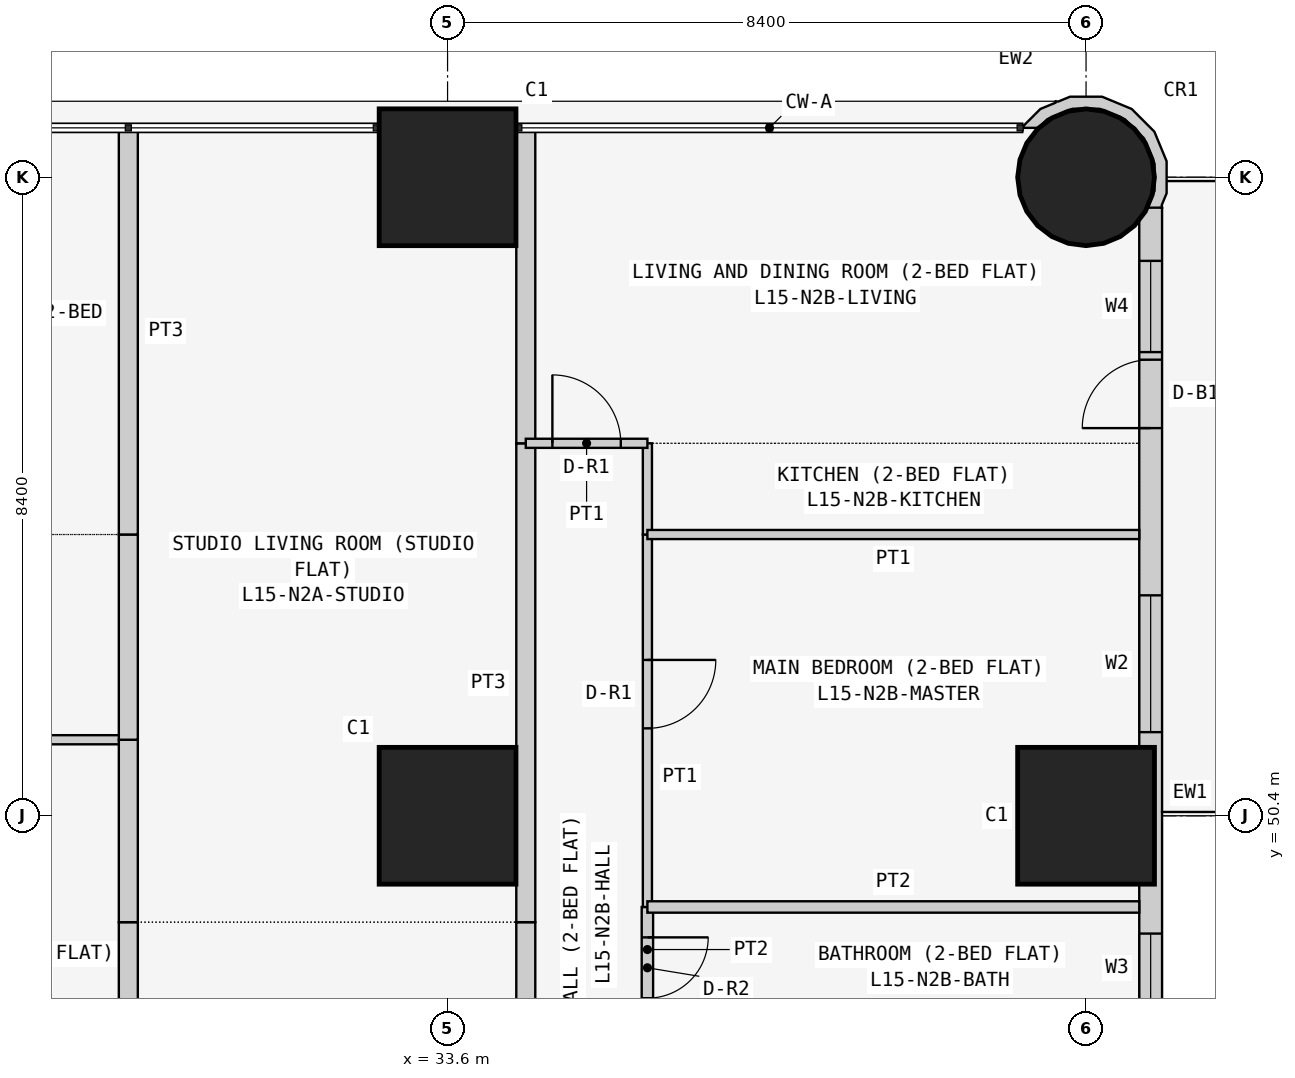
"""IFC4 building model, lengths in metres.
Left out: names, types, materials, properties, quantities, classifications, styles, units other than length and angle.
Written with IfcOpenShell. Run it as: python <this file> out.ifc"""

import sys

from ifc_helpers import new_model, si_unit, direction, frame, frame_2d, origin, origin_2d, place, context, subcontext, project, spatial, polyline, rectangle, circle, outline, extrude, element, fill, save


model = new_model("IFC4")
c1 = context("Model", 3, precision=1e-05, world=origin(), true_north=direction((0.0, 1.0)))
c2 = subcontext(c1, "Body", "Model", "MODEL_VIEW")
j1 = project(units=[si_unit("LENGTHUNIT", "METRE"), si_unit("PLANEANGLEUNIT", "RADIAN")], contexts=[c1])
p1 = place(None, origin())
s1 = spatial("IfcSite", under=j1, at=p1, CompositionType="ELEMENT")
p2 = place(p1, origin())
s2 = spatial("IfcBuilding", under=s1, at=p2, CompositionType="ELEMENT")
p3 = place(p2, frame((0.0, 0.0, 63.3)))
s3 = spatial("IfcBuildingStorey", under=s2, at=p3, CompositionType="ELEMENT", Elevation=63.3)
for number, where, z_axis, x_axis in (
    (1, (33.6, 50.4, 0.0), (0.0, 0.0, 1.0), (1.0, 0.0, 0.0)),
    (2, (33.6, 58.8, 0.0), (0.0, 0.0, 1.0), (1.0, 0.0, 0.0)),
    (3, (42.0, 50.4, 0.0), (0.0, 0.0, 1.0), (1.0, 0.0, 0.0)),
):
    element("IfcColumn", number, at=place(p3, frame(where, z_axis=z_axis, x_axis=x_axis)), inside=s3, PredefinedType="COLUMN", context=c2, shape_type="SweptSolid", body=[
        extrude(rectangle(XDim=1.8, YDim=1.8, at=origin_2d()), origin(), (0.0, 0.0, 1.0), 3.6),
    ])
p4 = place(p3, frame((42.0, 58.8, 0.0), z_axis=(0.0, 0.0, 1.0), x_axis=(1.0, 0.0, 0.0)))
e4 = element("IfcColumn", 4, at=p4, inside=s3, PredefinedType="COLUMN", context=c2, shape_type="SweptSolid", body=[
    extrude(circle(Radius=0.9, at=origin_2d()), origin(), (0.0, 0.0, 1.0), 3.6),
])
p5 = place(p3, frame((42.85, 43.0, 0.0), z_axis=(0.0, 0.0, 1.0), x_axis=(0.0, 1.0, 0.0)))
e5 = element("IfcWall", 5, at=p5, inside=s3, PredefinedType="SOLIDWALL", context=c2, shape_type="SweptSolid", body=[
    extrude(rectangle(XDim=15.4, YDim=0.3, at=frame_2d((7.7, 0.0))), origin(), (0.0, 0.0, 1.0), 3.45),
])
p6 = place(p5, frame((1.2, 0.0, 0.9)))
e6 = element("IfcOpeningElement", 6, at=p6, cuts=e5, PredefinedType="OPENING", context=c2, shape_type="SweptSolid", body=[
    extrude(rectangle(XDim=1.8, YDim=1.5, at=frame_2d((0.9, 0.75))), frame((0.0, 0.16, 0.0), z_axis=(0.0, -1.0, 0.0), x_axis=(1.0, 0.0, 0.0)), (0.0, 0.0, 1.0), 0.32),
])
p7 = place(p5, frame((4.95, 0.0, 1.5)))
e7 = element("IfcOpeningElement", 7, at=p7, cuts=e5, PredefinedType="OPENING", context=c2, shape_type="SweptSolid", body=[
    extrude(rectangle(XDim=0.9, YDim=0.7, at=frame_2d((0.45, 0.35))), frame((0.0, 0.16, 0.0), z_axis=(0.0, -1.0, 0.0), x_axis=(1.0, 0.0, 0.0)), (0.0, 0.0, 1.0), 0.32),
])
p8 = place(p5, frame((8.5, 0.0, 0.9)))
e8 = element("IfcOpeningElement", 8, at=p8, cuts=e5, PredefinedType="OPENING", context=c2, shape_type="SweptSolid", body=[
    extrude(rectangle(XDim=1.8, YDim=1.5, at=frame_2d((0.9, 0.75))), frame((0.0, 0.16, 0.0), z_axis=(0.0, -1.0, 0.0), x_axis=(1.0, 0.0, 0.0)), (0.0, 0.0, 1.0), 0.32),
])
p9 = place(p5, frame((12.5, 0.0, 0.0)))
e9 = element("IfcOpeningElement", 9, at=p9, cuts=e5, PredefinedType="OPENING", context=c2, shape_type="SweptSolid", body=[
    extrude(rectangle(XDim=0.9, YDim=2.4, at=frame_2d((0.45, 1.2))), frame((0.0, 0.16, 0.0), z_axis=(0.0, -1.0, 0.0), x_axis=(1.0, 0.0, 0.0)), (0.0, 0.0, 1.0), 0.32),
])
p10 = place(p5, frame((13.5, 0.0, 0.9)))
e10 = element("IfcOpeningElement", 10, at=p10, cuts=e5, PredefinedType="OPENING", context=c2, shape_type="SweptSolid", body=[
    extrude(rectangle(XDim=1.2, YDim=1.5, at=frame_2d((0.6, 0.75))), frame((0.0, 0.16, 0.0), z_axis=(0.0, -1.0, 0.0), x_axis=(1.0, 0.0, 0.0)), (0.0, 0.0, 1.0), 0.32),
])
p11 = place(p3, frame((42.91, 58.436, 0.0), z_axis=(0.0, 0.0, 1.0), x_axis=(0.377204953059, 0.926129809145, 0.0)))
e11 = element("IfcWall", 11, at=p11, inside=s3, PredefinedType="SOLIDWALL", context=c2, shape_type="SweptSolid", body=[
    extrude(outline(polyline([(0.769, 1.728), (0.75, 1.723), (0.6, 1.875), (0.295, 2.004), (0.281, 1.998), (0.36, 1.803), (0.509, 1.741), (0.761, 1.486), (0.896, 1.154), (0.894, 0.795), (0.755, 0.465), (0.5, 0.213), (0.168, 0.078), (-0.1, 0.08), (0.001, -0.097), (0.03, -0.08), (0.198, -0.081), (0.589, 0.078), (0.889, 0.374), (1.052, 0.763), (1.055, 1.185), (0.896, 1.575), (0.778, 1.695), (0.769, 1.728)])), origin(), (0.0, 0.0, 1.0), 3.45),
])
p12 = place(p3, frame((29.4, 51.4, 0.0), z_axis=(0.0, 0.0, 1.0), x_axis=(-1.0, 0.0, 0.0)))
e12 = element("IfcWall", 12, at=p12, inside=s3, PredefinedType="PARTITIONING", context=c2, shape_type="SweptSolid", body=[
    extrude(rectangle(XDim=5.229, YDim=0.12, at=frame_2d((2.615, 0.0))), origin(), (0.0, 0.0, 1.0), 3.45),
])
for number, where, z_axis, x_axis in (
    (13, (29.4, 46.6, 0.0), (0.0, 0.0, 1.0), (0.0, 1.0, 0.0)),
    (14, (29.4, 49.0, 0.0), (0.0, 0.0, 1.0), (0.0, 1.0, 0.0)),
):
    element("IfcWall", number, at=place(p3, frame(where, z_axis=z_axis, x_axis=x_axis)), inside=s3, PredefinedType="PARTITIONING", context=c2, shape_type="SweptSolid", body=[
        extrude(rectangle(XDim=2.4, YDim=0.25, at=frame_2d((1.2, 0.0))), origin(), (0.0, 0.0, 1.0), 2.848),
    ])
p13 = place(p3, frame((29.4, 51.4, 0.0), z_axis=(0.0, 0.0, 1.0), x_axis=(0.0, 1.0, 0.0)))
e15 = element("IfcWall", 15, at=p13, inside=s3, PredefinedType="PARTITIONING", context=c2, shape_type="SweptSolid", body=[
    extrude(rectangle(XDim=2.7, YDim=0.25, at=frame_2d((1.35, 0.0))), origin(), (0.0, 0.0, 1.0), 2.848),
])
p14 = place(p3, frame((29.4, 54.1, 0.0), z_axis=(0.0, 0.0, 1.0), x_axis=(0.0, 1.0, 0.0)))
e16 = element("IfcWall", 16, at=p14, inside=s3, PredefinedType="PARTITIONING", context=c2, shape_type="SweptSolid", body=[
    extrude(rectangle(XDim=5.35, YDim=0.25, at=frame_2d((2.675, 0.0))), origin(), (0.0, 0.0, 1.0), 2.848),
])
p15 = place(p3, frame((34.629, 49.0, 0.0), z_axis=(0.0, 0.0, 1.0), x_axis=(0.0, -1.0, 0.0)))
e17 = element("IfcWall", 17, at=p15, inside=s3, PredefinedType="PARTITIONING", context=c2, shape_type="SweptSolid", body=[
    extrude(rectangle(XDim=3.6, YDim=0.25, at=frame_2d((1.8, 0.0))), origin(), (0.0, 0.0, 1.0), 3.45),
])
p16 = place(p3, frame((34.629, 55.3, 0.0), z_axis=(0.0, 0.0, 1.0), x_axis=(0.0, -1.0, 0.0)))
e18 = element("IfcWall", 18, at=p16, inside=s3, PredefinedType="PARTITIONING", context=c2, shape_type="SweptSolid", body=[
    extrude(rectangle(XDim=6.3, YDim=0.25, at=frame_2d((3.15, 0.0))), origin(), (0.0, 0.0, 1.0), 3.45),
])
p17 = place(p3, frame((34.629, 59.45, 0.0), z_axis=(0.0, 0.0, 1.0), x_axis=(0.0, -1.0, 0.0)))
e19 = element("IfcWall", 19, at=p17, inside=s3, PredefinedType="PARTITIONING", context=c2, shape_type="SweptSolid", body=[
    extrude(rectangle(XDim=4.15, YDim=0.25, at=frame_2d((2.075, 0.0))), origin(), (0.0, 0.0, 1.0), 3.45),
])
p18 = place(p3, frame((36.229, 49.2, 0.0), z_axis=(0.0, 0.0, 1.0), x_axis=(0.0, -1.0, 0.0)))
e20 = element("IfcWall", 20, at=p18, inside=s3, PredefinedType="PARTITIONING", context=c2, shape_type="SweptSolid", body=[
    extrude(rectangle(XDim=1.6, YDim=0.15, at=frame_2d((0.8, 0.0))), origin(), (0.0, 0.0, 1.0), 3.45),
])
p19 = place(p18, frame((0.4, 0.0, 0.0)))
e21 = element("IfcOpeningElement", 21, at=p19, cuts=e20, PredefinedType="OPENING", context=c2, shape_type="SweptSolid", body=[
    extrude(rectangle(XDim=0.8, YDim=2.1, at=frame_2d((0.4, 1.05))), frame((0.0, 0.085, 0.0), z_axis=(0.0, -1.0, 0.0), x_axis=(1.0, 0.0, 0.0)), (0.0, 0.0, 1.0), 0.17),
])
p20 = place(p3, frame((36.229, 54.1, 0.0), z_axis=(0.0, 0.0, 1.0), x_axis=(0.0, -1.0, 0.0)))
e22 = element("IfcWall", 22, at=p20, inside=s3, PredefinedType="PARTITIONING", context=c2, shape_type="SweptSolid", body=[
    extrude(rectangle(XDim=4.9, YDim=0.12, at=frame_2d((2.45, 0.0))), origin(), (0.0, 0.0, 1.0), 3.45),
])
p21 = place(p20, frame((1.65, 0.0, 0.0)))
e23 = element("IfcOpeningElement", 23, at=p21, cuts=e22, PredefinedType="OPENING", context=c2, shape_type="SweptSolid", body=[
    extrude(rectangle(XDim=0.9, YDim=2.1, at=frame_2d((0.45, 1.05))), frame((0.0, 0.07, 0.0), z_axis=(0.0, -1.0, 0.0), x_axis=(1.0, 0.0, 0.0)), (0.0, 0.0, 1.0), 0.14),
])
p22 = place(p3, frame((36.229, 55.3, 0.0), z_axis=(0.0, 0.0, 1.0), x_axis=(0.0, -1.0, 0.0)))
e24 = element("IfcWall", 24, at=p22, inside=s3, PredefinedType="PARTITIONING", context=c2, shape_type="SweptSolid", body=[
    extrude(rectangle(XDim=1.2, YDim=0.12, at=frame_2d((0.6, 0.0))), origin(), (0.0, 0.0, 1.0), 3.45),
])
p23 = place(p3, frame((34.629, 55.3, 0.0), z_axis=(0.0, 0.0, 1.0), x_axis=(1.0, 0.0, 0.0)))
e25 = element("IfcWall", 25, at=p23, inside=s3, PredefinedType="PARTITIONING", context=c2, shape_type="SweptSolid", body=[
    extrude(rectangle(XDim=1.6, YDim=0.12, at=frame_2d((0.8, 0.0))), origin(), (0.0, 0.0, 1.0), 3.45),
])
p24 = place(p23, frame((0.35, 0.0, 0.0)))
e26 = element("IfcOpeningElement", 26, at=p24, cuts=e25, PredefinedType="OPENING", context=c2, shape_type="SweptSolid", body=[
    extrude(rectangle(XDim=0.9, YDim=2.1, at=frame_2d((0.45, 1.05))), frame((0.0, 0.07, 0.0), z_axis=(0.0, -1.0, 0.0), x_axis=(1.0, 0.0, 0.0)), (0.0, 0.0, 1.0), 0.14),
])
p25 = place(p3, frame((36.229, 49.2, 0.0), z_axis=(0.0, 0.0, 1.0), x_axis=(1.0, 0.0, 0.0)))
e27 = element("IfcWall", 27, at=p25, inside=s3, PredefinedType="PARTITIONING", context=c2, shape_type="SweptSolid", body=[
    extrude(rectangle(XDim=6.471, YDim=0.15, at=frame_2d((3.235, 0.0))), origin(), (0.0, 0.0, 1.0), 3.45),
])
p26 = place(p3, frame((36.229, 54.1, 0.0), z_axis=(0.0, 0.0, 1.0), x_axis=(1.0, 0.0, 0.0)))
e28 = element("IfcWall", 28, at=p26, inside=s3, PredefinedType="PARTITIONING", context=c2, shape_type="SweptSolid", body=[
    extrude(rectangle(XDim=6.471, YDim=0.12, at=frame_2d((3.235, 0.0))), origin(), (0.0, 0.0, 1.0), 3.45),
])
p27 = place(p7, origin())
e29 = element("IfcWindow", 29, at=p27, inside=s3, PartitioningType="SINGLE_PANEL", PredefinedType="WINDOW", context=c2, shape_type="SweptSolid", body=[
    extrude(rectangle(XDim=0.9, YDim=0.7, at=frame_2d((0.45, 0.35))), frame((0.0, 0.03, 0.0), z_axis=(0.0, -1.0, 0.0), x_axis=(1.0, 0.0, 0.0)), (0.0, 0.0, 1.0), 0.06),
])
fill(e7, e29)
p28 = place(p8, origin())
e30 = element("IfcWindow", 30, at=p28, inside=s3, PartitioningType="SINGLE_PANEL", PredefinedType="WINDOW", context=c2, shape_type="SweptSolid", body=[
    extrude(rectangle(XDim=1.8, YDim=1.5, at=frame_2d((0.9, 0.75))), frame((0.0, 0.03, 0.0), z_axis=(0.0, -1.0, 0.0), x_axis=(1.0, 0.0, 0.0)), (0.0, 0.0, 1.0), 0.06),
])
fill(e8, e30)
p29 = place(p9, origin())
e31 = element("IfcDoor", 31, at=p29, inside=s3, OperationType="SINGLE_SWING_LEFT", PredefinedType="DOOR", context=c2, shape_type="SweptSolid", body=[
    extrude(rectangle(XDim=0.9, YDim=2.4, at=frame_2d((0.45, 1.2))), frame((0.0, 0.025, 0.0), z_axis=(0.0, -1.0, 0.0), x_axis=(1.0, 0.0, 0.0)), (0.0, 0.0, 1.0), 0.05),
])
fill(e9, e31)
p30 = place(p10, origin())
e32 = element("IfcWindow", 32, at=p30, inside=s3, PartitioningType="SINGLE_PANEL", PredefinedType="WINDOW", context=c2, shape_type="SweptSolid", body=[
    extrude(rectangle(XDim=1.2, YDim=1.5, at=frame_2d((0.6, 0.75))), frame((0.0, 0.03, 0.0), z_axis=(0.0, -1.0, 0.0), x_axis=(1.0, 0.0, 0.0)), (0.0, 0.0, 1.0), 0.06),
])
fill(e10, e32)
p31 = place(p19, origin())
e33 = element("IfcDoor", 33, at=p31, inside=s3, OperationType="SINGLE_SWING_LEFT", PredefinedType="DOOR", context=c2, shape_type="SweptSolid", body=[
    extrude(rectangle(XDim=0.8, YDim=2.1, at=frame_2d((0.4, 1.05))), frame((0.0, 0.025, 0.0), z_axis=(0.0, -1.0, 0.0), x_axis=(1.0, 0.0, 0.0)), (0.0, 0.0, 1.0), 0.05),
])
fill(e21, e33)
p32 = place(p21, origin())
e34 = element("IfcDoor", 34, at=p32, inside=s3, OperationType="SINGLE_SWING_LEFT", PredefinedType="DOOR", context=c2, shape_type="SweptSolid", body=[
    extrude(rectangle(XDim=0.9, YDim=2.1, at=frame_2d((0.45, 1.05))), frame((0.0, 0.025, 0.0), z_axis=(0.0, -1.0, 0.0), x_axis=(1.0, 0.0, 0.0)), (0.0, 0.0, 1.0), 0.05),
])
fill(e23, e34)
p33 = place(p24, origin())
e35 = element("IfcDoor", 35, at=p33, inside=s3, OperationType="SINGLE_SWING_LEFT", PredefinedType="DOOR", context=c2, shape_type="SweptSolid", body=[
    extrude(rectangle(XDim=0.9, YDim=2.1, at=frame_2d((0.45, 1.05))), frame((0.0, 0.025, 0.0), z_axis=(0.0, -1.0, 0.0), x_axis=(1.0, 0.0, 0.0)), (0.0, 0.0, 1.0), 0.05),
])
fill(e26, e35)
save(model, sys.argv[1])
